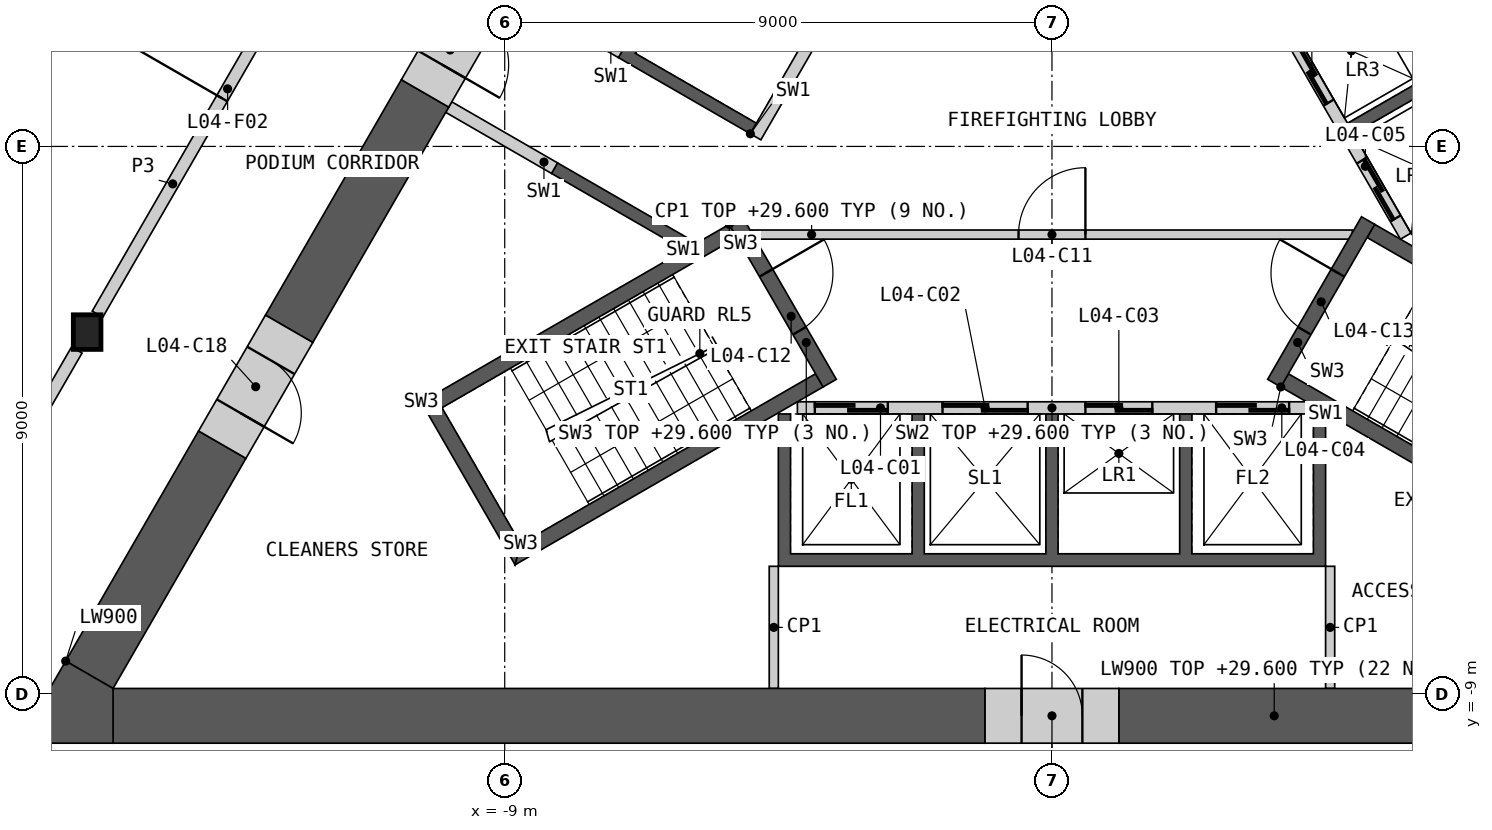
"""IFC4 building model, lengths in metres.
Left out: names, types, materials, properties, quantities, classifications, styles, units other than length and angle.
Written with IfcOpenShell. Run it as: python <this file> out.ifc"""

import sys

from ifc_helpers import new_model, si_unit, direction, frame, frame_2d, origin, origin_2d, place, context, subcontext, project, spatial, polyline, rectangle, i_section, outline, extrude, element, fill, save


model = new_model("IFC4")
c1 = context("Model", 3, precision=1e-05, world=origin(), true_north=direction((0.0, 1.0)))
c2 = subcontext(c1, "Body", "Model", "MODEL_VIEW")
j1 = project(units=[si_unit("LENGTHUNIT", "METRE"), si_unit("PLANEANGLEUNIT", "RADIAN")], contexts=[c1])
p1 = place(None, origin())
s1 = spatial("IfcSite", under=j1, at=p1, CompositionType="ELEMENT")
p2 = place(p1, origin())
s2 = spatial("IfcBuilding", under=s1, at=p2, CompositionType="ELEMENT")
p3 = place(p2, frame((0.0, 0.0, 25.5)))
s3 = spatial("IfcBuildingStorey", under=s2, at=p3, CompositionType="ELEMENT", Elevation=25.5)
p4 = place(p3, frame((-15.868, -3.054, 0.0), z_axis=(0.0, 0.0, 1.0), x_axis=(1.0, 0.0, 0.0)))
e1 = element("IfcColumn", 1, at=p4, inside=s3, PredefinedType="COLUMN", context=c2, shape_type="SweptSolid", body=[
    extrude(i_section(OverallWidth=0.454, OverallDepth=0.57, WebThickness=0.078, FlangeThickness=0.125, at=origin_2d()), origin(), (0.0, 0.0, 1.0), 4.5),
])
p5 = place(p3, origin())
e2 = element("IfcWall", 2, at=p5, inside=s3, PredefinedType="SHEAR", context=c2, shape_type="SweptSolid", body=[
    extrude(outline(polyline([(4.5, -4.4), (4.5, -6.906), (-4.5, -6.906), (-4.5, -4.4), (-4.3, -4.4), (-4.3, -6.7), (-2.3, -6.7), (-2.3, -4.4), (-2.1, -4.4), (-2.1, -6.7), (-0.1, -6.7), (-0.1, -4.4), (0.1, -4.4), (0.1, -6.7), (2.1, -6.7), (2.1, -4.4), (2.3, -4.4), (2.3, -6.7), (4.3, -6.7), (4.3, -4.4), (4.5, -4.4)])), origin(), (0.0, 0.0, 1.0), 4.1),
])
p6 = place(p3, frame((-4.187, -4.3, 0.0), z_axis=(0.0, 0.0, 1.0), x_axis=(1.0, 0.0, 0.0)))
e3 = element("IfcWall", 3, at=p6, inside=s3, PredefinedType="SOLIDWALL", context=c2, shape_type="SweptSolid", body=[
    extrude(rectangle(XDim=8.373, YDim=0.2, at=frame_2d((4.187, 0.0))), origin(), (0.0, 0.0, 1.0), 4.1),
])
p7 = place(p6, frame((0.287, 0.0, 0.0)))
e4 = element("IfcOpeningElement", 4, at=p7, cuts=e3, PredefinedType="OPENING", context=c2, shape_type="SweptSolid", body=[
    extrude(rectangle(XDim=1.2, YDim=2.1, at=frame_2d((0.6, 1.05))), frame((0.0, 0.11, 0.0), z_axis=(0.0, -1.0, 0.0), x_axis=(1.0, 0.0, 0.0)), (0.0, 0.0, 1.0), 0.22),
])
p8 = place(p6, frame((2.387, 0.0, 0.0)))
e5 = element("IfcOpeningElement", 5, at=p8, cuts=e3, PredefinedType="OPENING", context=c2, shape_type="SweptSolid", body=[
    extrude(rectangle(XDim=1.4, YDim=2.1, at=frame_2d((0.7, 1.05))), frame((0.0, 0.11, 0.0), z_axis=(0.0, -1.0, 0.0), x_axis=(1.0, 0.0, 0.0)), (0.0, 0.0, 1.0), 0.22),
])
p9 = place(p6, frame((4.737, 0.0, 0.0)))
e6 = element("IfcOpeningElement", 6, at=p9, cuts=e3, PredefinedType="OPENING", context=c2, shape_type="SweptSolid", body=[
    extrude(rectangle(XDim=1.1, YDim=2.1, at=frame_2d((0.55, 1.05))), frame((0.0, 0.11, 0.0), z_axis=(0.0, -1.0, 0.0), x_axis=(1.0, 0.0, 0.0)), (0.0, 0.0, 1.0), 0.22),
])
p10 = place(p6, frame((6.887, 0.0, 0.0)))
e7 = element("IfcOpeningElement", 7, at=p10, cuts=e3, PredefinedType="OPENING", context=c2, shape_type="SweptSolid", body=[
    extrude(rectangle(XDim=1.2, YDim=2.1, at=frame_2d((0.6, 1.05))), frame((0.0, 0.11, 0.0), z_axis=(0.0, -1.0, 0.0), x_axis=(1.0, 0.0, 0.0)), (0.0, 0.0, 1.0), 0.22),
])
p11 = place(p3, origin())
e8 = element("IfcWall", 8, at=p11, inside=s3, PredefinedType="SHEAR", context=c2, shape_type="SweptSolid", body=[
    extrude(outline(polyline([(2.66, 4.192), (4.831, 5.445), (8.231, -0.444), (6.061, -1.697), (5.96, -1.524), (7.952, -0.374), (6.952, 1.358), (4.96, 0.208), (4.861, 0.381), (6.852, 1.531), (5.852, 3.263), (3.861, 2.113), (3.76, 2.287), (5.752, 3.437), (4.752, 5.169), (2.76, 4.019), (2.66, 4.192)])), origin(), (0.0, 0.0, 1.0), 4.1),
])
p12 = place(p3, frame((5.817, -1.476, 0.0), z_axis=(0.0, 0.0, 1.0), x_axis=(-0.500002616675, 0.866023893041, 0.0)))
e9 = element("IfcWall", 9, at=p12, inside=s3, PredefinedType="SOLIDWALL", context=c2, shape_type="SweptSolid", body=[
    extrude(rectangle(XDim=8.373, YDim=0.2, at=frame_2d((4.187, 0.0))), origin(), (0.0, 0.0, 1.0), 4.1),
])
p13 = place(p12, frame((0.337, 0.0, 0.0)))
e10 = element("IfcOpeningElement", 10, at=p13, cuts=e9, PredefinedType="OPENING", context=c2, shape_type="SweptSolid", body=[
    extrude(rectangle(XDim=1.1, YDim=2.1, at=frame_2d((0.55, 1.05))), frame((0.0, 0.11, 0.0), z_axis=(0.0, -1.0, 0.0), x_axis=(1.0, 0.0, 0.0)), (0.0, 0.0, 1.0), 0.22),
])
p14 = place(p12, frame((2.537, 0.0, 0.0)))
e11 = element("IfcOpeningElement", 11, at=p14, cuts=e9, PredefinedType="OPENING", context=c2, shape_type="SweptSolid", body=[
    extrude(rectangle(XDim=1.1, YDim=2.1, at=frame_2d((0.55, 1.05))), frame((0.0, 0.11, 0.0), z_axis=(0.0, -1.0, 0.0), x_axis=(1.0, 0.0, 0.0)), (0.0, 0.0, 1.0), 0.22),
])
p15 = place(p12, frame((4.737, 0.0, 0.0)))
e12 = element("IfcOpeningElement", 12, at=p15, cuts=e9, PredefinedType="OPENING", context=c2, shape_type="SweptSolid", body=[
    extrude(rectangle(XDim=1.1, YDim=2.1, at=frame_2d((0.55, 1.05))), frame((0.0, 0.11, 0.0), z_axis=(0.0, -1.0, 0.0), x_axis=(1.0, 0.0, 0.0)), (0.0, 0.0, 1.0), 0.22),
])
p16 = place(p12, frame((7.037, 0.0, 0.0)))
e13 = element("IfcOpeningElement", 13, at=p16, cuts=e9, PredefinedType="OPENING", context=c2, shape_type="SweptSolid", body=[
    extrude(rectangle(XDim=0.9, YDim=2.1, at=frame_2d((0.45, 1.05))), frame((0.0, 0.11, 0.0), z_axis=(0.0, -1.0, 0.0), x_axis=(1.0, 0.0, 0.0)), (0.0, 0.0, 1.0), 0.22),
])
p17 = place(p3, origin())
e14 = element("IfcWall", 14, at=p17, inside=s3, PredefinedType="SHEAR", context=c2, shape_type="SweptSolid", body=[
    extrude(outline(polyline([(-6.061, -1.697), (-8.231, -0.444), (-8.131, -0.271), (-5.96, -1.524), (-6.061, -1.697)])), origin(), (0.0, 0.0, 1.0), 4.1),
])
p18 = place(p3, origin())
e15 = element("IfcWall", 15, at=p18, inside=s3, PredefinedType="SHEAR", context=c2, shape_type="SweptSolid", body=[
    extrude(outline(polyline([(-4.96, 0.208), (-7.131, 1.461), (-5.931, 3.54), (-3.76, 2.287), (-3.861, 2.113), (-5.852, 3.263), (-6.852, 1.531), (-4.861, 0.381), (-4.96, 0.208)])), origin(), (0.0, 0.0, 1.0), 4.1),
])
p19 = place(p3, frame((-1.631, 5.776, 0.0), z_axis=(0.0, 0.0, 1.0), x_axis=(-0.499992876559, -0.866029516466, 0.0)))
e16 = element("IfcWall", 16, at=p19, inside=s3, PredefinedType="SOLIDWALL", context=c2, shape_type="SweptSolid", body=[
    extrude(rectangle(XDim=6.486, YDim=0.2, at=frame_2d((3.243, 0.0))), origin(), (0.0, 0.0, 1.0), 4.1),
])
p20 = place(p19, frame((0.437, 0.0, 0.0)))
e17 = element("IfcOpeningElement", 17, at=p20, cuts=e16, PredefinedType="OPENING", context=c2, shape_type="SweptSolid", body=[
    extrude(rectangle(XDim=0.9, YDim=2.1, at=frame_2d((0.45, 1.05))), frame((0.0, 0.11, 0.0), z_axis=(0.0, -1.0, 0.0), x_axis=(1.0, 0.0, 0.0)), (0.0, 0.0, 1.0), 0.22),
])
p21 = place(p19, frame((2.637, 0.0, 0.0)))
e18 = element("IfcOpeningElement", 18, at=p21, cuts=e16, PredefinedType="OPENING", context=c2, shape_type="SweptSolid", body=[
    extrude(rectangle(XDim=0.9, YDim=2.1, at=frame_2d((0.45, 1.05))), frame((0.0, 0.11, 0.0), z_axis=(0.0, -1.0, 0.0), x_axis=(1.0, 0.0, 0.0)), (0.0, 0.0, 1.0), 0.22),
])
p22 = place(p3, frame((-7.081, 1.548, 0.0), z_axis=(0.0, 0.0, 1.0), x_axis=(-0.865983199114, 0.50007309351, 0.0)))
e19 = element("IfcWall", 19, at=p22, inside=s3, PredefinedType="SHEAR", context=c2, shape_type="SweptSolid", body=[
    extrude(rectangle(XDim=2.009, YDim=0.2, at=frame_2d((1.004, 0.0))), origin(), (0.0, 0.0, 1.0), 4.1),
])
p23 = place(p3, frame((-8.181, -0.357, 0.0), z_axis=(0.0, 0.0, 1.0), x_axis=(-0.866035824272, 0.499981950752, 0.0)))
e20 = element("IfcWall", 20, at=p23, inside=s3, PredefinedType="SHEAR", context=c2, shape_type="SweptSolid", body=[
    extrude(rectangle(XDim=2.009, YDim=0.2, at=frame_2d((1.004, 0.0))), origin(), (0.0, 0.0, 1.0), 4.1),
])
p24 = place(p3, frame((-4.941, -1.45, 0.0), z_axis=(0.0, 0.0, 1.0), x_axis=(1.0, 0.0, 0.0)))
e21 = element("IfcWall", 21, at=p24, inside=s3, PredefinedType="PARTITIONING", context=c2, shape_type="SweptSolid", body=[
    extrude(rectangle(XDim=9.882, YDim=0.15, at=frame_2d((4.941, 0.0))), origin(), (0.0, 0.0, 1.0), 4.1),
])
p25 = place(p24, frame((4.391, 0.0, 0.0)))
e22 = element("IfcOpeningElement", 22, at=p25, cuts=e21, PredefinedType="OPENING", context=c2, shape_type="SweptSolid", body=[
    extrude(rectangle(XDim=1.1, YDim=2.1, at=frame_2d((0.55, 1.05))), frame((0.0, 0.085, 0.0), z_axis=(0.0, -1.0, 0.0), x_axis=(1.0, 0.0, 0.0)), (0.0, 0.0, 1.0), 0.17),
])
p26 = place(p3, origin())
e23 = element("IfcWall", 23, at=p26, inside=s3, PredefinedType="SHEAR", context=c2, shape_type="SweptSolid", body=[
    extrude(outline(polyline([(-5.307, -1.281), (-10.374, -4.206), (-10.032, -4.298), (-5.182, -1.498), (-5.307, -1.281)])), origin(), (0.0, 0.0, 1.0), 4.1),
])
p27 = place(p3, origin())
e24 = element("IfcWall", 24, at=p27, inside=s3, PredefinedType="SHEAR", context=c2, shape_type="SweptSolid", body=[
    extrude(outline(polyline([(-10.374, -4.206), (-8.83, -6.881), (-8.738, -6.539), (-10.032, -4.298), (-10.374, -4.206)])), origin(), (0.0, 0.0, 1.0), 4.1),
])
p28 = place(p3, origin())
e25 = element("IfcWall", 25, at=p28, inside=s3, PredefinedType="SHEAR", context=c2, shape_type="SweptSolid", body=[
    extrude(outline(polyline([(-8.738, -6.539), (-8.83, -6.881), (-3.763, -3.956), (-3.888, -3.739), (-8.738, -6.539)])), origin(), (0.0, 0.0, 1.0), 4.1),
])
p29 = place(p3, frame((-5.199, -1.219, 0.0), z_axis=(0.0, 0.0, 1.0), x_axis=(0.499982516597, -0.866035497597, 0.0)))
e26 = element("IfcWall", 26, at=p29, inside=s3, PredefinedType="SHEAR", context=c2, shape_type="SweptSolid", body=[
    extrude(rectangle(XDim=3.088, YDim=0.25, at=frame_2d((1.544, 0.0))), origin(), (0.0, 0.0, 1.0), 4.1),
])
p30 = place(p29, frame((0.994, 0.0, 0.0)))
e27 = element("IfcOpeningElement", 27, at=p30, cuts=e26, PredefinedType="OPENING", context=c2, shape_type="SweptSolid", body=[
    extrude(rectangle(XDim=1.1, YDim=2.1, at=frame_2d((0.55, 1.05))), frame((0.0, 0.135, 0.0), z_axis=(0.0, -1.0, 0.0), x_axis=(1.0, 0.0, 0.0)), (0.0, 0.0, 1.0), 0.27),
])
p31 = place(p3, origin())
e28 = element("IfcWall", 28, at=p31, inside=s3, PredefinedType="SHEAR", context=c2, shape_type="SweptSolid", body=[
    extrude(outline(polyline([(3.763, -3.956), (8.83, -6.881), (8.738, -6.539), (3.888, -3.739), (3.763, -3.956)])), origin(), (0.0, 0.0, 1.0), 4.1),
])
p32 = place(p3, origin())
e29 = element("IfcWall", 29, at=p32, inside=s3, PredefinedType="SHEAR", context=c2, shape_type="SweptSolid", body=[
    extrude(outline(polyline([(10.032, -4.298), (10.374, -4.206), (5.307, -1.281), (5.182, -1.498), (10.032, -4.298)])), origin(), (0.0, 0.0, 1.0), 4.1),
])
p33 = place(p3, frame((3.655, -3.893, 0.0), z_axis=(0.0, 0.0, 1.0), x_axis=(0.499982516597, 0.866035497597, 0.0)))
e30 = element("IfcWall", 30, at=p33, inside=s3, PredefinedType="SHEAR", context=c2, shape_type="SweptSolid", body=[
    extrude(rectangle(XDim=3.088, YDim=0.25, at=frame_2d((1.544, 0.0))), origin(), (0.0, 0.0, 1.0), 4.1),
])
p34 = place(p33, frame((0.994, 0.0, 0.0)))
e31 = element("IfcOpeningElement", 31, at=p34, cuts=e30, PredefinedType="OPENING", context=c2, shape_type="SweptSolid", body=[
    extrude(rectangle(XDim=1.1, YDim=2.1, at=frame_2d((0.55, 1.05))), frame((0.0, 0.135, 0.0), z_axis=(0.0, -1.0, 0.0), x_axis=(1.0, 0.0, 0.0)), (0.0, 0.0, 1.0), 0.27),
])
for number, where, z_axis, x_axis in (
    (32, (4.575, -6.906, 0.0), (0.0, 0.0, 1.0), (0.0, -1.0, 0.0)),
    (33, (-4.575, -6.906, 0.0), (0.0, 0.0, 1.0), (0.0, -1.0, 0.0)),
):
    element("IfcWall", number, at=place(p3, frame(where, z_axis=z_axis, x_axis=x_axis)), inside=s3, PredefinedType="PARTITIONING", context=c2, shape_type="SweptSolid", body=[
        extrude(rectangle(XDim=2.009, YDim=0.15, at=frame_2d((1.004, 0.0))), origin(), (0.0, 0.0, 1.0), 4.1),
    ])
p35 = place(p3, frame((-15.441, -9.365, 0.0), z_axis=(0.0, 0.0, 1.0), x_axis=(1.0, 0.0, 0.0)))
e34 = element("IfcWall", 34, at=p35, inside=s3, PredefinedType="SHEAR", context=c2, shape_type="SweptSolid", body=[
    extrude(rectangle(XDim=14.341, YDim=0.9, at=frame_2d((7.17, 0.0))), origin(), (0.0, 0.0, 1.0), 4.1),
])
p36 = place(p3, frame((1.1, -9.365, 0.0), z_axis=(0.0, 0.0, 1.0), x_axis=(1.0, 0.0, 0.0)))
e35 = element("IfcWall", 35, at=p36, inside=s3, PredefinedType="SHEAR", context=c2, shape_type="SweptSolid", body=[
    extrude(rectangle(XDim=5.11, YDim=0.9, at=frame_2d((2.555, 0.0))), origin(), (0.0, 0.0, 1.0), 4.1),
])
p37 = place(p3, frame((-10.31, 0.872, 0.0), z_axis=(0.0, 0.0, 1.0), x_axis=(-0.499991893987, -0.866030083742, 0.0)))
e36 = element("IfcWall", 36, at=p37, inside=s3, PredefinedType="SHEAR", context=c2, shape_type="SweptSolid", body=[
    extrude(rectangle(XDim=4.471, YDim=0.9, at=frame_2d((2.235, 0.0))), origin(), (0.0, 0.0, 1.0), 4.1),
])
p38 = place(p3, frame((-13.646, -4.905, 0.0), z_axis=(0.0, 0.0, 1.0), x_axis=(-0.499990005186, -0.866031174216, 0.0)))
e37 = element("IfcWall", 37, at=p38, inside=s3, PredefinedType="SHEAR", context=c2, shape_type="SweptSolid", body=[
    extrude(rectangle(XDim=4.371, YDim=0.9, at=frame_2d((2.185, 0.0))), origin(), (0.0, 0.0, 1.0), 4.1),
])
p39 = place(p3, origin())
e38 = element("IfcWall", 38, at=p39, inside=s3, PredefinedType="SHEAR", context=c2, shape_type="SweptSolid", body=[
    extrude(outline(polyline([(-16.221, -8.465), (-15.441, -8.915), (-15.441, -9.815), (-17.0, -9.815), (-16.221, -8.465)])), origin(), (0.0, 0.0, 1.0), 4.1),
])
p40 = place(p3, frame((-1.1, -9.365, 0.0), z_axis=(0.0, 0.0, 1.0), x_axis=(1.0, 0.0, 0.0)))
e39 = element("IfcWall", 39, at=p40, inside=s3, PredefinedType="SHEAR", context=c2, shape_type="SweptSolid", body=[
    extrude(rectangle(XDim=2.2, YDim=0.9, at=frame_2d((1.1, 0.0))), origin(), (0.0, 0.0, 1.0), 4.1),
])
p41 = place(p40, frame((0.6, 0.0, 0.0)))
e40 = element("IfcOpeningElement", 40, at=p41, cuts=e39, PredefinedType="OPENING", context=c2, shape_type="SweptSolid", body=[
    extrude(rectangle(XDim=1.0, YDim=2.1, at=frame_2d((0.5, 1.05))), frame((0.0, 0.46, 0.0), z_axis=(0.0, -1.0, 0.0), x_axis=(1.0, 0.0, 0.0)), (0.0, 0.0, 1.0), 0.92),
])
p42 = place(p3, frame((-12.546, -3.0, 0.0), z_axis=(0.0, 0.0, 1.0), x_axis=(-0.499994660107, -0.866028486751, 0.0)))
e41 = element("IfcWall", 41, at=p42, inside=s3, PredefinedType="SHEAR", context=c2, shape_type="SweptSolid", body=[
    extrude(rectangle(XDim=2.2, YDim=0.9, at=frame_2d((1.1, 0.0))), origin(), (0.0, 0.0, 1.0), 4.1),
])
p43 = place(p42, frame((0.6, 0.0, 0.0)))
e42 = element("IfcOpeningElement", 42, at=p43, cuts=e41, PredefinedType="OPENING", context=c2, shape_type="SweptSolid", body=[
    extrude(rectangle(XDim=1.0, YDim=2.1, at=frame_2d((0.5, 1.05))), frame((0.0, 0.46, 0.0), z_axis=(0.0, -1.0, 0.0), x_axis=(1.0, 0.0, 0.0)), (0.0, 0.0, 1.0), 0.92),
])
p44 = place(p3, frame((-9.21, 2.777, 0.0), z_axis=(0.0, 0.0, 1.0), x_axis=(-0.500077893725, -0.86598042715, 0.0)))
e43 = element("IfcWall", 43, at=p44, inside=s3, PredefinedType="SHEAR", context=c2, shape_type="SweptSolid", body=[
    extrude(rectangle(XDim=2.2, YDim=0.9, at=frame_2d((1.1, 0.0))), origin(), (0.0, 0.0, 1.0), 4.1),
])
p45 = place(p44, frame((0.55, 0.0, 0.0)))
e44 = element("IfcOpeningElement", 44, at=p45, cuts=e43, PredefinedType="OPENING", context=c2, shape_type="SweptSolid", body=[
    extrude(rectangle(XDim=1.1, YDim=2.1, at=frame_2d((0.55, 1.05))), frame((0.0, 0.46, 0.0), z_axis=(0.0, -1.0, 0.0), x_axis=(1.0, 0.0, 0.0)), (0.0, 0.0, 1.0), 0.92),
])
p46 = place(p3, frame((-15.698, -2.759, 0.0), z_axis=(0.0, 0.0, 1.0), x_axis=(0.500004292778, 0.866022925334, 0.0)))
e45 = element("IfcWall", 45, at=p46, inside=s3, PredefinedType="PARTITIONING", context=c2, shape_type="SweptSolid", body=[
    extrude(rectangle(XDim=9.898, YDim=0.2, at=frame_2d((4.949, 0.0))), origin(), (0.0, 0.0, 1.0), 4.1),
])
p47 = place(p46, frame((4.1, 0.0, 0.0)))
e46 = element("IfcOpeningElement", 46, at=p47, cuts=e45, PredefinedType="OPENING", context=c2, shape_type="SweptSolid", body=[
    extrude(rectangle(XDim=1.8, YDim=2.1, at=frame_2d((0.9, 1.05))), frame((0.0, 0.11, 0.0), z_axis=(0.0, -1.0, 0.0), x_axis=(1.0, 0.0, 0.0)), (0.0, 0.0, 1.0), 0.22),
])
p48 = place(p3, frame((-19.244, -8.902, 0.0), z_axis=(0.0, 0.0, 1.0), x_axis=(0.499988314375, 0.866032150378, 0.0)))
e47 = element("IfcWall", 47, at=p48, inside=s3, PredefinedType="PARTITIONING", context=c2, shape_type="SweptSolid", body=[
    extrude(rectangle(XDim=6.412, YDim=0.2, at=frame_2d((3.206, 0.0))), origin(), (0.0, 0.0, 1.0), 4.1),
])
p49 = place(p7, origin())
e48 = element("IfcDoor", 48, at=p49, inside=s3, OperationType="SLIDING_TO_LEFT", PredefinedType="DOOR", context=c2, shape_type="SweptSolid", body=[
    extrude(rectangle(XDim=1.2, YDim=2.1, at=frame_2d((0.6, 1.05))), frame((0.0, 0.025, 0.0), z_axis=(0.0, -1.0, 0.0), x_axis=(1.0, 0.0, 0.0)), (0.0, 0.0, 1.0), 0.05),
])
fill(e4, e48)
p50 = place(p8, origin())
e49 = element("IfcDoor", 49, at=p50, inside=s3, OperationType="SLIDING_TO_LEFT", PredefinedType="DOOR", context=c2, shape_type="SweptSolid", body=[
    extrude(rectangle(XDim=1.4, YDim=2.1, at=frame_2d((0.7, 1.05))), frame((0.0, 0.025, 0.0), z_axis=(0.0, -1.0, 0.0), x_axis=(1.0, 0.0, 0.0)), (0.0, 0.0, 1.0), 0.05),
])
fill(e5, e49)
p51 = place(p9, origin())
e50 = element("IfcDoor", 50, at=p51, inside=s3, OperationType="SLIDING_TO_LEFT", PredefinedType="DOOR", context=c2, shape_type="SweptSolid", body=[
    extrude(rectangle(XDim=1.1, YDim=2.1, at=frame_2d((0.55, 1.05))), frame((0.0, 0.025, 0.0), z_axis=(0.0, -1.0, 0.0), x_axis=(1.0, 0.0, 0.0)), (0.0, 0.0, 1.0), 0.05),
])
fill(e6, e50)
p52 = place(p10, origin())
e51 = element("IfcDoor", 51, at=p52, inside=s3, OperationType="SLIDING_TO_LEFT", PredefinedType="DOOR", context=c2, shape_type="SweptSolid", body=[
    extrude(rectangle(XDim=1.2, YDim=2.1, at=frame_2d((0.6, 1.05))), frame((0.0, 0.025, 0.0), z_axis=(0.0, -1.0, 0.0), x_axis=(1.0, 0.0, 0.0)), (0.0, 0.0, 1.0), 0.05),
])
fill(e7, e51)
p53 = place(p13, origin())
e52 = element("IfcDoor", 52, at=p53, inside=s3, OperationType="SLIDING_TO_LEFT", PredefinedType="DOOR", context=c2, shape_type="SweptSolid", body=[
    extrude(rectangle(XDim=1.1, YDim=2.1, at=frame_2d((0.55, 1.05))), frame((0.0, 0.025, 0.0), z_axis=(0.0, -1.0, 0.0), x_axis=(1.0, 0.0, 0.0)), (0.0, 0.0, 1.0), 0.05),
])
fill(e10, e52)
p54 = place(p14, origin())
e53 = element("IfcDoor", 53, at=p54, inside=s3, OperationType="SLIDING_TO_LEFT", PredefinedType="DOOR", context=c2, shape_type="SweptSolid", body=[
    extrude(rectangle(XDim=1.1, YDim=2.1, at=frame_2d((0.55, 1.05))), frame((0.0, 0.025, 0.0), z_axis=(0.0, -1.0, 0.0), x_axis=(1.0, 0.0, 0.0)), (0.0, 0.0, 1.0), 0.05),
])
fill(e11, e53)
p55 = place(p25, origin())
e54 = element("IfcDoor", 54, at=p55, inside=s3, OperationType="SINGLE_SWING_RIGHT", PredefinedType="DOOR", context=c2, shape_type="SweptSolid", body=[
    extrude(rectangle(XDim=1.1, YDim=2.1, at=frame_2d((0.55, 1.05))), frame((0.0, 0.025, 0.0), z_axis=(0.0, -1.0, 0.0), x_axis=(1.0, 0.0, 0.0)), (0.0, 0.0, 1.0), 0.05),
])
fill(e22, e54)
p56 = place(p30, origin())
e55 = element("IfcDoor", 55, at=p56, inside=s3, OperationType="SINGLE_SWING_LEFT", PredefinedType="DOOR", context=c2, shape_type="SweptSolid", body=[
    extrude(rectangle(XDim=1.1, YDim=2.1, at=frame_2d((0.55, 1.05))), frame((0.0, 0.025, 0.0), z_axis=(0.0, -1.0, 0.0), x_axis=(1.0, 0.0, 0.0)), (0.0, 0.0, 1.0), 0.05),
])
fill(e27, e55)
p57 = place(p34, origin())
e56 = element("IfcDoor", 56, at=p57, inside=s3, OperationType="SINGLE_SWING_RIGHT", PredefinedType="DOOR", context=c2, shape_type="SweptSolid", body=[
    extrude(rectangle(XDim=1.1, YDim=2.1, at=frame_2d((0.55, 1.05))), frame((0.0, 0.025, 0.0), z_axis=(0.0, -1.0, 0.0), x_axis=(1.0, 0.0, 0.0)), (0.0, 0.0, 1.0), 0.05),
])
fill(e31, e56)
p58 = place(p41, origin())
e57 = element("IfcDoor", 57, at=p58, inside=s3, OperationType="SINGLE_SWING_LEFT", PredefinedType="DOOR", context=c2, shape_type="SweptSolid", body=[
    extrude(rectangle(XDim=1.0, YDim=2.1, at=frame_2d((0.5, 1.05))), frame((0.0, 0.205, 0.0), z_axis=(0.0, -1.0, 0.0), x_axis=(1.0, 0.0, 0.0)), (0.0, 0.0, 1.0), 0.05),
])
fill(e40, e57)
p59 = place(p43, origin())
e58 = element("IfcDoor", 58, at=p59, inside=s3, OperationType="SINGLE_SWING_RIGHT", PredefinedType="DOOR", context=c2, shape_type="SweptSolid", body=[
    extrude(rectangle(XDim=1.0, YDim=2.1, at=frame_2d((0.5, 1.05))), frame((0.0, 0.205, 0.0), z_axis=(0.0, -1.0, 0.0), x_axis=(1.0, 0.0, 0.0)), (0.0, 0.0, 1.0), 0.05),
])
fill(e42, e58)
p60 = place(p45, origin())
e59 = element("IfcDoor", 59, at=p60, inside=s3, OperationType="SINGLE_SWING_RIGHT", PredefinedType="DOOR", context=c2, shape_type="SweptSolid", body=[
    extrude(rectangle(XDim=1.1, YDim=2.1, at=frame_2d((0.55, 1.05))), frame((0.0, 0.205, 0.0), z_axis=(0.0, -1.0, 0.0), x_axis=(1.0, 0.0, 0.0)), (0.0, 0.0, 1.0), 0.05),
])
fill(e44, e59)
p61 = place(p47, origin())
e60 = element("IfcDoor", 60, at=p61, inside=s3, OperationType="DOUBLE_DOOR_SINGLE_SWING", PredefinedType="DOOR", context=c2, shape_type="SweptSolid", body=[
    extrude(rectangle(XDim=1.8, YDim=2.1, at=frame_2d((0.9, 1.05))), frame((0.0, 0.025, 0.0), z_axis=(0.0, -1.0, 0.0), x_axis=(1.0, 0.0, 0.0)), (0.0, 0.0, 1.0), 0.05),
])
fill(e46, e60)
save(model, sys.argv[1])
